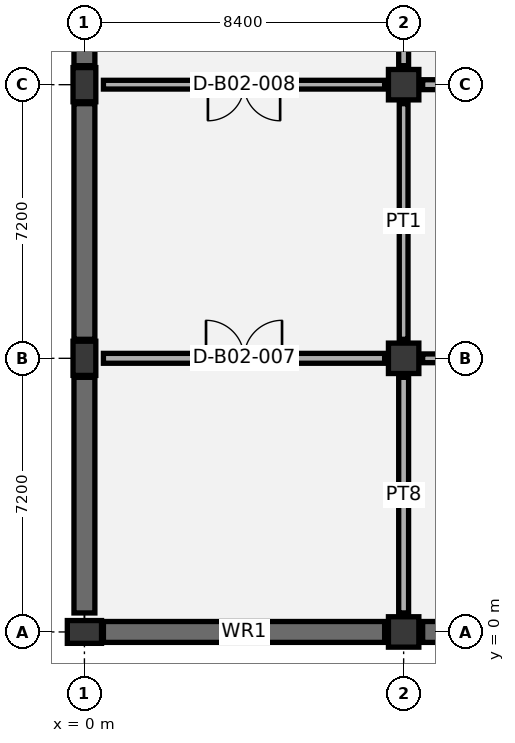
"""IFC4 building model, lengths in metres.
Left out: names, types, materials, properties, quantities, classifications, styles, units other than length and angle.
Written with IfcOpenShell. Run it as: python <this file> out.ifc"""

import sys

from ifc_helpers import new_model, si_unit, direction, frame, frame_2d, origin, origin_2d, place, context, subcontext, project, spatial, rectangle, extrude, element, fill, save


model = new_model("IFC4")
c1 = context("Model", 3, precision=1e-05, world=origin(), true_north=direction((0.0, 1.0)))
c2 = subcontext(c1, "Body", "Model", "MODEL_VIEW")
j1 = project(units=[si_unit("LENGTHUNIT", "METRE"), si_unit("PLANEANGLEUNIT", "RADIAN")], contexts=[c1])
p1 = place(None, origin())
s1 = spatial("IfcSite", under=j1, at=p1, CompositionType="ELEMENT")
p2 = place(p1, origin())
s2 = spatial("IfcBuilding", under=s1, at=p2, CompositionType="ELEMENT")
p3 = place(p2, frame((0.0, 0.0, -9.6)))
s3 = spatial("IfcBuildingStorey", under=s2, at=p3, CompositionType="ELEMENT", Elevation=-9.6)
for number, where, z_axis, x_axis in (
    (1, (0.0, 0.0, 0.0), (0.0, 0.0, 1.0), (0.0, 1.0, 0.0)),
    (2, (0.0, 7.2, 0.0), (0.0, 0.0, 1.0), (1.0, 0.0, 0.0)),
    (3, (0.0, 14.4, 0.0), (0.0, 0.0, 1.0), (1.0, 0.0, 0.0)),
):
    element("IfcColumn", number, at=place(p3, frame(where, z_axis=z_axis, x_axis=x_axis)), inside=s3, PredefinedType="COLUMN", context=c2, shape_type="SweptSolid", body=[
        extrude(rectangle(XDim=0.6, YDim=0.9, at=origin_2d()), origin(), (0.0, 0.0, 1.0), 4.8),
    ])
for number, where, z_axis, x_axis in (
    (4, (8.4, 0.0, 0.0), (0.0, 0.0, 1.0), (1.0, 0.0, 0.0)),
    (5, (8.4, 7.2, 0.0), (0.0, 0.0, 1.0), (1.0, 0.0, 0.0)),
    (6, (8.4, 14.4, 0.0), (0.0, 0.0, 1.0), (1.0, 0.0, 0.0)),
):
    element("IfcColumn", number, at=place(p3, frame(where, z_axis=z_axis, x_axis=x_axis)), inside=s3, PredefinedType="COLUMN", context=c2, shape_type="SweptSolid", body=[
        extrude(rectangle(XDim=0.8, YDim=0.8, at=origin_2d()), origin(), (0.0, 0.0, 1.0), 4.8),
    ])
p4 = place(p3, frame((0.5, 0.0, 0.0), z_axis=(0.0, 0.0, 1.0), x_axis=(1.0, 0.0, 0.0)))
e7 = element("IfcWall", 7, at=p4, inside=s3, PredefinedType="USERDEFINED", context=c2, shape_type="SweptSolid", body=[
    extrude(rectangle(XDim=7.4, YDim=0.55, at=frame_2d((3.7, 0.0))), origin(), (0.0, 0.0, 1.0), 4.4),
])
for number, where, z_axis, x_axis in (
    (8, (0.0, 0.5, 0.0), (0.0, 0.0, 1.0), (0.0, 1.0, 0.0)),
    (9, (0.0, 7.7, 0.0), (0.0, 0.0, 1.0), (0.0, 1.0, 0.0)),
):
    element("IfcWall", number, at=place(p3, frame(where, z_axis=z_axis, x_axis=x_axis)), inside=s3, PredefinedType="USERDEFINED", context=c2, shape_type="SweptSolid", body=[
        extrude(rectangle(XDim=6.2, YDim=0.55, at=frame_2d((3.1, 0.0))), origin(), (0.0, 0.0, 1.0), 4.4),
    ])
p5 = place(p3, frame((0.0, 14.9, 0.0), z_axis=(0.0, 0.0, 1.0), x_axis=(0.0, 1.0, 0.0)))
e10 = element("IfcWall", 10, at=p5, inside=s3, PredefinedType="USERDEFINED", context=c2, shape_type="SweptSolid", body=[
    extrude(rectangle(XDim=6.2, YDim=0.55, at=frame_2d((3.1, 0.0))), origin(), (0.0, 0.0, 1.0), 4.4),
])
p6 = place(p3, frame((8.9, 0.0, 0.0), z_axis=(0.0, 0.0, 1.0), x_axis=(1.0, 0.0, 0.0)))
e11 = element("IfcWall", 11, at=p6, inside=s3, PredefinedType="USERDEFINED", context=c2, shape_type="SweptSolid", body=[
    extrude(rectangle(XDim=7.4, YDim=0.55, at=frame_2d((3.7, 0.0))), origin(), (0.0, 0.0, 1.0), 4.4),
])
p7 = place(p3, frame((8.4, 0.5, 0.0), z_axis=(0.0, 0.0, 1.0), x_axis=(0.0, 1.0, 0.0)))
e12 = element("IfcWall", 12, at=p7, inside=s3, PredefinedType="PARTITIONING", context=c2, shape_type="SweptSolid", body=[
    extrude(rectangle(XDim=6.2, YDim=0.26, at=frame_2d((3.1, 0.0))), origin(), (0.0, 0.0, 1.0), 3.595),
])
p8 = place(p3, frame((0.5, 7.2, 0.0), z_axis=(0.0, 0.0, 1.0), x_axis=(1.0, 0.0, 0.0)))
e13 = element("IfcWall", 13, at=p8, inside=s3, PredefinedType="PARTITIONING", context=c2, shape_type="SweptSolid", body=[
    extrude(rectangle(XDim=7.4, YDim=0.26, at=frame_2d((3.7, 0.0))), origin(), (0.0, 0.0, 1.0), 3.495),
])
p9 = place(p8, frame((2.7, 0.0, 0.0)))
e14 = element("IfcOpeningElement", 14, at=p9, cuts=e13, PredefinedType="OPENING", context=c2, shape_type="SweptSolid", body=[
    extrude(rectangle(XDim=2.0, YDim=2.35, at=frame_2d((1.0, 1.175))), frame((0.0, 0.14, 0.0), z_axis=(0.0, -1.0, 0.0), x_axis=(1.0, 0.0, 0.0)), (0.0, 0.0, 1.0), 0.28),
])
p10 = place(p3, frame((8.4, 7.7, 0.0), z_axis=(0.0, 0.0, 1.0), x_axis=(0.0, 1.0, 0.0)))
e15 = element("IfcWall", 15, at=p10, inside=s3, PredefinedType="PARTITIONING", context=c2, shape_type="SweptSolid", body=[
    extrude(rectangle(XDim=6.2, YDim=0.23, at=frame_2d((3.1, 0.0))), origin(), (0.0, 0.0, 1.0), 3.595),
])
p11 = place(p3, frame((0.5, 14.4, 0.0), z_axis=(0.0, 0.0, 1.0), x_axis=(1.0, 0.0, 0.0)))
e16 = element("IfcWall", 16, at=p11, inside=s3, PredefinedType="PARTITIONING", context=c2, shape_type="SweptSolid", body=[
    extrude(rectangle(XDim=7.4, YDim=0.23, at=frame_2d((3.7, 0.0))), origin(), (0.0, 0.0, 1.0), 3.495),
])
p12 = place(p11, frame((2.75, 0.0, 0.0)))
e17 = element("IfcOpeningElement", 17, at=p12, cuts=e16, PredefinedType="OPENING", context=c2, shape_type="SweptSolid", body=[
    extrude(rectangle(XDim=1.9, YDim=2.3, at=frame_2d((0.95, 1.15))), frame((0.0, 0.125, 0.0), z_axis=(0.0, -1.0, 0.0), x_axis=(1.0, 0.0, 0.0)), (0.0, 0.0, 1.0), 0.25),
])
p13 = place(p3, frame((8.4, 14.9, 0.0), z_axis=(0.0, 0.0, 1.0), x_axis=(0.0, 1.0, 0.0)))
e18 = element("IfcWall", 18, at=p13, inside=s3, PredefinedType="PARTITIONING", context=c2, shape_type="SweptSolid", body=[
    extrude(rectangle(XDim=6.2, YDim=0.26, at=frame_2d((3.1, 0.0))), origin(), (0.0, 0.0, 1.0), 3.595),
])
p14 = place(p3, frame((8.9, 7.2, 0.0), z_axis=(0.0, 0.0, 1.0), x_axis=(1.0, 0.0, 0.0)))
e19 = element("IfcWall", 19, at=p14, inside=s3, PredefinedType="PARTITIONING", context=c2, shape_type="SweptSolid", body=[
    extrude(rectangle(XDim=7.4, YDim=0.23, at=frame_2d((3.7, 0.0))), origin(), (0.0, 0.0, 1.0), 3.495),
])
p15 = place(p14, frame((2.75, 0.0, 0.0)))
e20 = element("IfcOpeningElement", 20, at=p15, cuts=e19, PredefinedType="OPENING", context=c2, shape_type="SweptSolid", body=[
    extrude(rectangle(XDim=1.9, YDim=2.3, at=frame_2d((0.95, 1.15))), frame((0.0, 0.125, 0.0), z_axis=(0.0, -1.0, 0.0), x_axis=(1.0, 0.0, 0.0)), (0.0, 0.0, 1.0), 0.25),
])
p16 = place(p3, frame((8.9, 14.4, 0.0), z_axis=(0.0, 0.0, 1.0), x_axis=(1.0, 0.0, 0.0)))
e21 = element("IfcWall", 21, at=p16, inside=s3, PredefinedType="PARTITIONING", context=c2, shape_type="SweptSolid", body=[
    extrude(rectangle(XDim=7.4, YDim=0.26, at=frame_2d((3.7, 0.0))), origin(), (0.0, 0.0, 1.0), 3.495),
])
p17 = place(p16, frame((2.7, 0.0, 0.0)))
e22 = element("IfcOpeningElement", 22, at=p17, cuts=e21, PredefinedType="OPENING", context=c2, shape_type="SweptSolid", body=[
    extrude(rectangle(XDim=2.0, YDim=2.35, at=frame_2d((1.0, 1.175))), frame((0.0, 0.14, 0.0), z_axis=(0.0, -1.0, 0.0), x_axis=(1.0, 0.0, 0.0)), (0.0, 0.0, 1.0), 0.28),
])
p18 = place(p9, origin())
e23 = element("IfcDoor", 23, at=p18, inside=s3, OperationType="DOUBLE_DOOR_SINGLE_SWING", PredefinedType="DOOR", context=c2, shape_type="SweptSolid", body=[
    extrude(rectangle(XDim=2.0, YDim=2.35, at=frame_2d((1.0, 1.175))), frame((0.0, 0.025, 0.0), z_axis=(0.0, -1.0, 0.0), x_axis=(1.0, 0.0, 0.0)), (0.0, 0.0, 1.0), 0.05),
])
fill(e14, e23)
p19 = place(p12, frame((1.9, 0.0, 0.0), z_axis=(0.0, 0.0, 1.0), x_axis=(-1.0, 0.0, 0.0)))
e24 = element("IfcDoor", 24, at=p19, inside=s3, OperationType="DOUBLE_DOOR_SINGLE_SWING", PredefinedType="DOOR", context=c2, shape_type="SweptSolid", body=[
    extrude(rectangle(XDim=1.9, YDim=2.3, at=frame_2d((0.95, 1.15))), frame((0.0, 0.025, 0.0), z_axis=(0.0, -1.0, 0.0), x_axis=(1.0, 0.0, 0.0)), (0.0, 0.0, 1.0), 0.05),
])
fill(e17, e24)
save(model, sys.argv[1])
